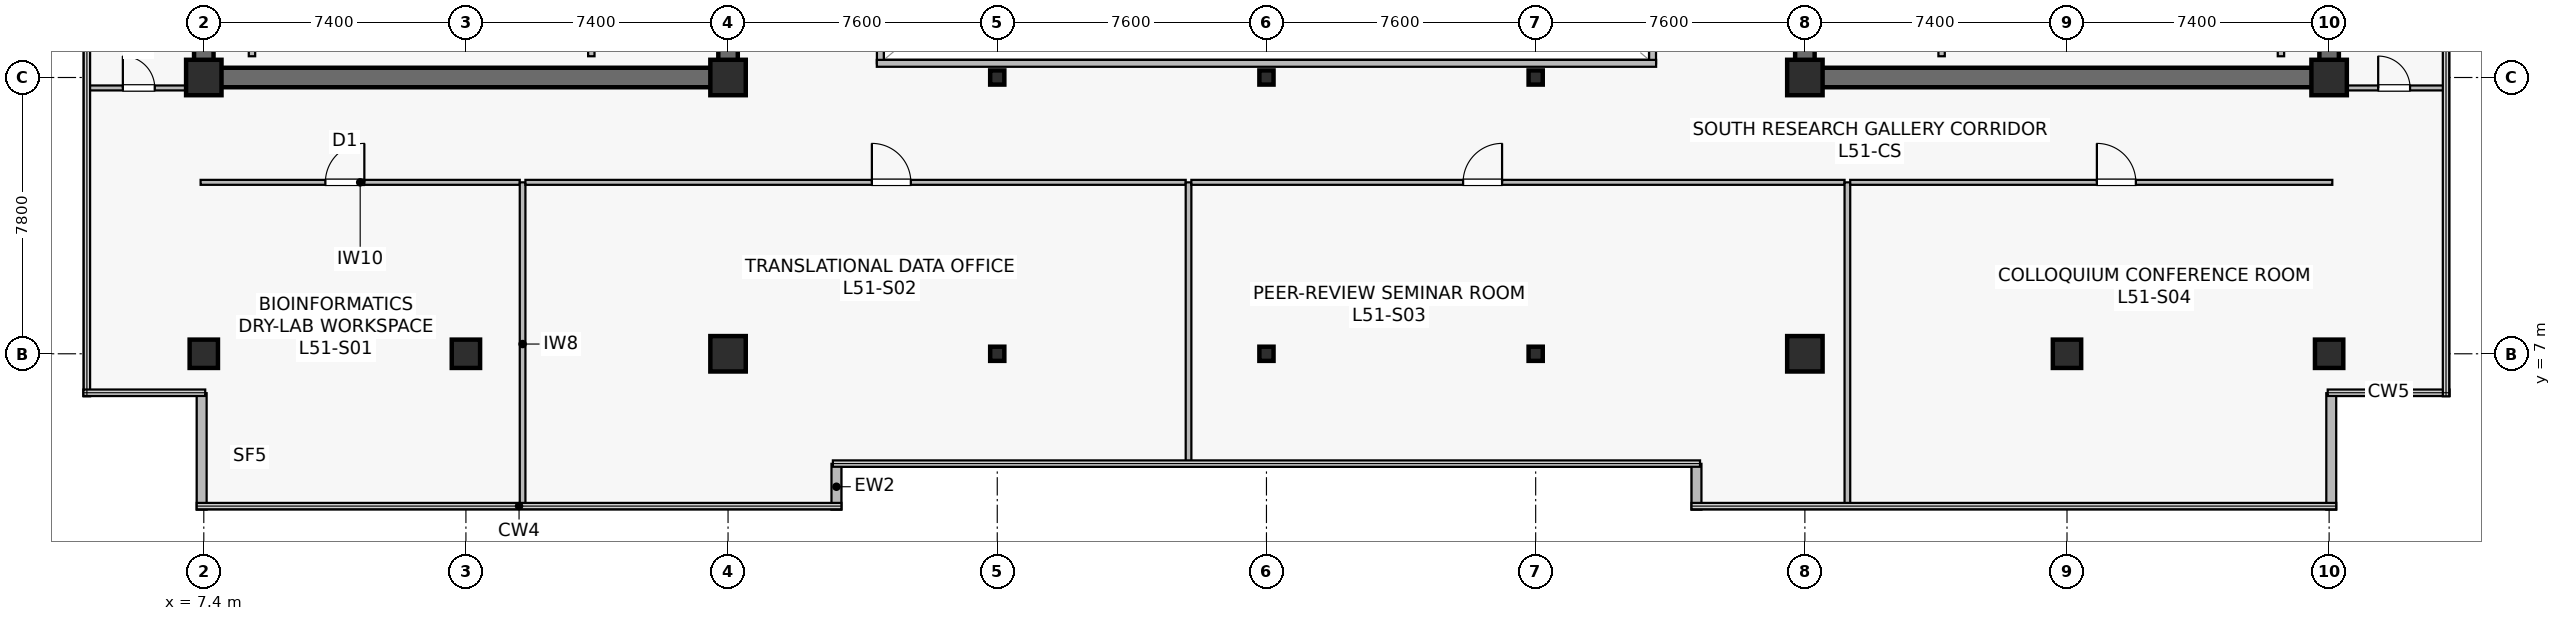
"""IFC4 building model, lengths in metres.
Left out: names, types, materials, properties, quantities, classifications, styles, units other than length and angle.
Written with IfcOpenShell. Run it as: python <this file> out.ifc"""

import sys

from ifc_helpers import new_model, si_unit, direction, frame, frame_2d, origin, origin_2d, place, context, subcontext, project, spatial, rectangle, hollow_rectangle, extrude, source, transform, mapped, element, fill, save


model = new_model("IFC4")
c1 = context("Model", 3, precision=1e-05, world=origin(), true_north=direction((0.0, 1.0)))
c2 = subcontext(c1, "Body", "Model", "MODEL_VIEW")
j1 = project(units=[si_unit("LENGTHUNIT", "METRE"), si_unit("PLANEANGLEUNIT", "RADIAN")], contexts=[c1])
p1 = place(None, origin())
s1 = spatial("IfcSite", under=j1, at=p1, CompositionType="ELEMENT")
p2 = place(p1, origin())
s2 = spatial("IfcBuilding", under=s1, at=p2, CompositionType="ELEMENT")
p3 = place(p2, frame((0.0, 0.0, 213.7)))
s3 = spatial("IfcBuildingStorey", under=s2, at=p3, CompositionType="ELEMENT", Elevation=213.7)
p4 = place(p3, frame((7.125, 14.8, 0.0), z_axis=(0.0, 0.0, 1.0), x_axis=(1.0, 0.0, 0.0)))
e1 = element("IfcWall", 1, at=p4, inside=s3, PredefinedType="SHEAR", context=c2, shape_type="SweptSolid", body=[
    extrude(rectangle(XDim=15.35, YDim=0.55, at=frame_2d((7.675, 0.0))), origin(), (0.0, 0.0, 1.0), 3.8),
])
p5 = place(p3, frame((7.4, 15.075, 0.0), z_axis=(0.0, 0.0, 1.0), x_axis=(0.0, 1.0, 0.0)))
e2 = element("IfcWall", 2, at=p5, inside=s3, PredefinedType="SHEAR", context=c2, shape_type="SweptSolid", body=[
    extrude(rectangle(XDim=18.45, YDim=0.55, at=frame_2d((9.225, 0.0))), origin(), (0.0, 0.0, 1.0), 3.8),
])
p6 = place(p3, frame((22.2, 15.075, 0.0), z_axis=(0.0, 0.0, 1.0), x_axis=(0.0, 1.0, 0.0)))
e3 = element("IfcWall", 3, at=p6, inside=s3, PredefinedType="SHEAR", context=c2, shape_type="SweptSolid", body=[
    extrude(rectangle(XDim=18.45, YDim=0.55, at=frame_2d((9.225, 0.0))), origin(), (0.0, 0.0, 1.0), 3.8),
])
p7 = place(p6, frame((3.475, 0.0, 0.0)))
e4 = element("IfcOpeningElement", 4, at=p7, cuts=e3, PredefinedType="OPENING", context=c2, shape_type="SweptSolid", body=[
    extrude(rectangle(XDim=1.42, YDim=2.2, at=frame_2d((0.71, 1.1))), frame((0.0, 0.285, 0.0), z_axis=(0.0, -1.0, 0.0), x_axis=(1.0, 0.0, 0.0)), (0.0, 0.0, 1.0), 0.57),
])
p8 = place(p3, frame((52.325, 14.8, 0.0), z_axis=(0.0, 0.0, 1.0), x_axis=(1.0, 0.0, 0.0)))
e5 = element("IfcWall", 5, at=p8, inside=s3, PredefinedType="SHEAR", context=c2, shape_type="SweptSolid", body=[
    extrude(rectangle(XDim=15.35, YDim=0.55, at=frame_2d((7.675, 0.0))), origin(), (0.0, 0.0, 1.0), 3.8),
])
p9 = place(p3, frame((52.6, 15.075, 0.0), z_axis=(0.0, 0.0, 1.0), x_axis=(0.0, 1.0, 0.0)))
e6 = element("IfcWall", 6, at=p9, inside=s3, PredefinedType="SHEAR", context=c2, shape_type="SweptSolid", body=[
    extrude(rectangle(XDim=18.45, YDim=0.55, at=frame_2d((9.225, 0.0))), origin(), (0.0, 0.0, 1.0), 3.8),
])
p10 = place(p9, frame((3.475, 0.0, 0.0)))
e7 = element("IfcOpeningElement", 7, at=p10, cuts=e6, PredefinedType="OPENING", context=c2, shape_type="SweptSolid", body=[
    extrude(rectangle(XDim=1.42, YDim=2.2, at=frame_2d((0.71, 1.1))), frame((0.0, 0.285, 0.0), z_axis=(0.0, -1.0, 0.0), x_axis=(1.0, 0.0, 0.0)), (0.0, 0.0, 1.0), 0.57),
])
p11 = place(p3, frame((67.4, 15.075, 0.0), z_axis=(0.0, 0.0, 1.0), x_axis=(0.0, 1.0, 0.0)))
e8 = element("IfcWall", 8, at=p11, inside=s3, PredefinedType="SHEAR", context=c2, shape_type="SweptSolid", body=[
    extrude(rectangle(XDim=18.45, YDim=0.55, at=frame_2d((9.225, 0.0))), origin(), (0.0, 0.0, 1.0), 3.8),
])
m1 = source(origin(), c2, "Body", "SweptSolid", [
    extrude(rectangle(XDim=0.8, YDim=0.8, at=origin_2d()), origin(), (0.0, 0.0, 1.0), 4.1),
])
p12 = place(p3, frame((14.8, 7.0, 0.0), z_axis=(0.0, 0.0, 1.0), x_axis=(1.0, 0.0, 0.0)))
e9 = element("IfcColumn", 9, at=p12, inside=s3, PredefinedType="COLUMN", context=c2, shape_type="MappedRepresentation", body=[
    mapped(m1, transform((0.0, 0.0, 0.0), scale=1.0)),
])
m2 = source(origin(), c2, "Body", "SweptSolid", [
    extrude(rectangle(XDim=1.0, YDim=1.0, at=origin_2d()), origin(), (0.0, 0.0, 1.0), 4.1),
])
for number, where, z_axis, x_axis in (
    (10, (22.2, 7.0, 0.0), (0.0, 0.0, 1.0), (1.0, 0.0, 0.0)),
    (11, (7.4, 14.8, 0.0), (0.0, 0.0, 1.0), (1.0, 0.0, 0.0)),
    (12, (22.2, 14.8, 0.0), (0.0, 0.0, 1.0), (1.0, 0.0, 0.0)),
    (13, (52.6, 7.0, 0.0), (0.0, 0.0, 1.0), (1.0, 0.0, 0.0)),
):
    element("IfcColumn", number, at=place(p3, frame(where, z_axis=z_axis, x_axis=x_axis)), inside=s3, PredefinedType="COLUMN", context=c2, shape_type="MappedRepresentation", body=[
        mapped(m2, transform((0.0, 0.0, 0.0), scale=1.0)),
    ])
p13 = place(p3, frame((60.0, 7.0, 0.0), z_axis=(0.0, 0.0, 1.0), x_axis=(1.0, 0.0, 0.0)))
e14 = element("IfcColumn", 14, at=p13, inside=s3, PredefinedType="COLUMN", context=c2, shape_type="MappedRepresentation", body=[
    mapped(m1, transform((0.0, 0.0, 0.0), scale=1.0)),
])
for number, where, z_axis, x_axis in (
    (15, (52.6, 14.8, 0.0), (0.0, 0.0, 1.0), (1.0, 0.0, 0.0)),
    (16, (67.4, 14.8, 0.0), (0.0, 0.0, 1.0), (1.0, 0.0, 0.0)),
):
    element("IfcColumn", number, at=place(p3, frame(where, z_axis=z_axis, x_axis=x_axis)), inside=s3, PredefinedType="COLUMN", context=c2, shape_type="MappedRepresentation", body=[
        mapped(m2, transform((0.0, 0.0, 0.0), scale=1.0)),
    ])
for number, where, z_axis, x_axis in (
    (17, (7.4, 7.0, 0.0), (0.0, 0.0, 1.0), (1.0, 0.0, 0.0)),
    (18, (67.4, 7.0, 0.0), (0.0, 0.0, 1.0), (1.0, 0.0, 0.0)),
):
    element("IfcColumn", number, at=place(p3, frame(where, z_axis=z_axis, x_axis=x_axis)), inside=s3, PredefinedType="COLUMN", context=c2, shape_type="MappedRepresentation", body=[
        mapped(m1, transform((0.0, 0.0, 0.0), scale=1.0)),
    ])
m3 = source(origin(), c2, "Body", "SweptSolid", [
    extrude(hollow_rectangle(XDim=0.4, YDim=0.4, WallThickness=0.019, at=origin_2d()), origin(), (0.0, 0.0, 1.0), 4.1),
])
for number, where, z_axis, x_axis in (
    (19, (29.8, 7.0, 0.0), (0.0, 0.0, 1.0), (1.0, 0.0, 0.0)),
    (20, (29.8, 14.8, 0.0), (0.0, 0.0, 1.0), (1.0, 0.0, 0.0)),
    (21, (37.4, 7.0, 0.0), (0.0, 0.0, 1.0), (1.0, 0.0, 0.0)),
    (22, (37.4, 14.8, 0.0), (0.0, 0.0, 1.0), (1.0, 0.0, 0.0)),
    (23, (45.0, 7.0, 0.0), (0.0, 0.0, 1.0), (1.0, 0.0, 0.0)),
    (24, (45.0, 14.8, 0.0), (0.0, 0.0, 1.0), (1.0, 0.0, 0.0)),
):
    element("IfcColumn", number, at=place(p3, frame(where, z_axis=z_axis, x_axis=x_axis)), inside=s3, PredefinedType="COLUMN", context=c2, shape_type="MappedRepresentation", body=[
        mapped(m3, transform((0.0, 0.0, 0.0), scale=1.0)),
    ])
for number, where, z_axis, x_axis in (
    (25, (25.26, 2.6, 0.0), (0.0, 0.0, 1.0), (0.0, 1.0, 0.0)),
    (26, (49.54, 3.893, 0.0), (0.0, 0.0, 1.0), (0.0, -1.0, 0.0)),
):
    element("IfcWall", number, at=place(p3, frame(where, z_axis=z_axis, x_axis=x_axis)), inside=s3, PredefinedType="STANDARD", context=c2, shape_type="SweptSolid", body=[
        extrude(rectangle(XDim=1.293, YDim=0.28, at=frame_2d((0.646, 0.0))), origin(), (0.0, 0.0, 1.0), 3.8),
    ])
for number, where, z_axis, x_axis in (
    (27, (67.46, 2.6, 0.0), (0.0, 0.0, 1.0), (0.0, 1.0, 0.0)),
    (28, (7.34, 5.888, 0.0), (0.0, 0.0, 1.0), (0.0, -1.0, 0.0)),
):
    element("IfcWall", number, at=place(p3, frame(where, z_axis=z_axis, x_axis=x_axis)), inside=s3, PredefinedType="STANDARD", context=c2, shape_type="SweptSolid", body=[
        extrude(rectangle(XDim=3.288, YDim=0.28, at=frame_2d((1.644, 0.0))), origin(), (0.0, 0.0, 1.0), 3.8),
    ])
for number, where, z_axis, x_axis in (
    (29, (18.34, 15.4, 0.0), (0.0, 0.0, 1.0), (0.0, 1.0, 0.0)),
    (30, (8.76, 15.4, 0.0), (0.0, 0.0, 1.0), (0.0, 1.0, 0.0)),
    (31, (56.46, 15.4, 0.0), (0.0, 0.0, 1.0), (0.0, 1.0, 0.0)),
    (32, (66.04, 15.4, 0.0), (0.0, 0.0, 1.0), (0.0, 1.0, 0.0)),
):
    element("IfcWall", number, at=place(p3, frame(where, z_axis=z_axis, x_axis=x_axis)), inside=s3, PredefinedType="SOLIDWALL", context=c2, shape_type="SweptSolid", body=[
        extrude(rectangle(XDim=2.4, YDim=0.18, at=frame_2d((1.2, 0.0))), origin(), (0.0, 0.0, 1.0), 3.8),
    ])
p14 = place(p3, frame((26.5, 15.2, 0.0), z_axis=(0.0, 0.0, 1.0), x_axis=(0.0, 1.0, 0.0)))
e33 = element("IfcWall", 33, at=p14, inside=s3, PredefinedType="SOLIDWALL", context=c2, shape_type="SweptSolid", body=[
    extrude(rectangle(XDim=18.2, YDim=0.195, at=frame_2d((9.1, 0.0))), origin(), (0.0, 0.0, 1.0), 3.8),
])
p15 = place(p14, frame((1.8, 0.0, 0.9)))
e34 = element("IfcOpeningElement", 34, at=p15, cuts=e33, PredefinedType="OPENING", context=c2, shape_type="SweptSolid", body=[
    extrude(rectangle(XDim=1.2, YDim=1.35, at=frame_2d((0.6, 0.675))), frame((0.0, 0.107, 0.0), z_axis=(0.0, -1.0, 0.0), x_axis=(1.0, 0.0, 0.0)), (0.0, 0.0, 1.0), 0.215),
])
p16 = place(p14, frame((13.2, 0.0, 0.9)))
e35 = element("IfcOpeningElement", 35, at=p16, cuts=e33, PredefinedType="OPENING", context=c2, shape_type="SweptSolid", body=[
    extrude(rectangle(XDim=1.2, YDim=1.35, at=frame_2d((0.6, 0.675))), frame((0.0, 0.107, 0.0), z_axis=(0.0, -1.0, 0.0), x_axis=(1.0, 0.0, 0.0)), (0.0, 0.0, 1.0), 0.215),
])
p17 = place(p3, frame((48.3, 15.2, 0.0), z_axis=(0.0, 0.0, 1.0), x_axis=(0.0, 1.0, 0.0)))
e36 = element("IfcWall", 36, at=p17, inside=s3, PredefinedType="SOLIDWALL", context=c2, shape_type="SweptSolid", body=[
    extrude(rectangle(XDim=18.2, YDim=0.195, at=frame_2d((9.1, 0.0))), origin(), (0.0, 0.0, 1.0), 3.8),
])
p18 = place(p17, frame((1.8, 0.0, 0.9)))
e37 = element("IfcOpeningElement", 37, at=p18, cuts=e36, PredefinedType="OPENING", context=c2, shape_type="SweptSolid", body=[
    extrude(rectangle(XDim=1.2, YDim=1.35, at=frame_2d((0.6, 0.675))), frame((0.0, 0.107, 0.0), z_axis=(0.0, -1.0, 0.0), x_axis=(1.0, 0.0, 0.0)), (0.0, 0.0, 1.0), 0.215),
])
p19 = place(p17, frame((13.2, 0.0, 0.9)))
e38 = element("IfcOpeningElement", 38, at=p19, cuts=e36, PredefinedType="OPENING", context=c2, shape_type="SweptSolid", body=[
    extrude(rectangle(XDim=1.2, YDim=1.35, at=frame_2d((0.6, 0.675))), frame((0.0, 0.107, 0.0), z_axis=(0.0, -1.0, 0.0), x_axis=(1.0, 0.0, 0.0)), (0.0, 0.0, 1.0), 0.215),
])
p20 = place(p3, frame((26.4, 15.2, 0.0), z_axis=(0.0, 0.0, 1.0), x_axis=(1.0, 0.0, 0.0)))
e39 = element("IfcWall", 39, at=p20, inside=s3, PredefinedType="SOLIDWALL", context=c2, shape_type="SweptSolid", body=[
    extrude(rectangle(XDim=22.0, YDim=0.195, at=frame_2d((11.0, 0.0))), origin(), (0.0, 0.0, 1.0), 3.8),
])
p21 = place(p3, frame((7.31, 11.84, 0.0), z_axis=(0.0, 0.0, 1.0), x_axis=(1.0, 0.0, 0.0)))
e40 = element("IfcWall", 40, at=p21, inside=s3, PredefinedType="PARTITIONING", context=c2, shape_type="SweptSolid", body=[
    extrude(rectangle(XDim=9.01, YDim=0.14, at=frame_2d((4.505, 0.0))), origin(), (0.0, 0.0, 1.0), 3.197),
])
p22 = place(p21, frame((3.522, 0.0, 0.0)))
e41 = element("IfcOpeningElement", 41, at=p22, cuts=e40, PredefinedType="OPENING", context=c2, shape_type="SweptSolid", body=[
    extrude(rectangle(XDim=1.1, YDim=2.18, at=frame_2d((0.55, 1.09))), frame((0.0, 0.08, 0.0), z_axis=(0.0, -1.0, 0.0), x_axis=(1.0, 0.0, 0.0)), (0.0, 0.0, 1.0), 0.16),
])
p23 = place(p3, frame((16.4, 2.71, 0.0), z_axis=(0.0, 0.0, 1.0), x_axis=(0.0, 1.0, 0.0)))
e42 = element("IfcWall", 42, at=p23, inside=s3, PredefinedType="PARTITIONING", context=c2, shape_type="SweptSolid", body=[
    extrude(rectangle(XDim=9.13, YDim=0.16, at=frame_2d((4.565, 0.0))), origin(), (0.0, 0.0, 1.0), 3.135),
])
p24 = place(p3, frame((16.48, 11.84, 0.0), z_axis=(0.0, 0.0, 1.0), x_axis=(1.0, 0.0, 0.0)))
e43 = element("IfcWall", 43, at=p24, inside=s3, PredefinedType="PARTITIONING", context=c2, shape_type="SweptSolid", body=[
    extrude(rectangle(XDim=18.64, YDim=0.14, at=frame_2d((9.32, 0.0))), origin(), (0.0, 0.0, 1.0), 3.197),
])
p25 = place(p24, frame((9.781, 0.0, 0.0)))
e44 = element("IfcOpeningElement", 44, at=p25, cuts=e43, PredefinedType="OPENING", context=c2, shape_type="SweptSolid", body=[
    extrude(rectangle(XDim=1.1, YDim=2.18, at=frame_2d((0.55, 1.09))), frame((0.0, 0.08, 0.0), z_axis=(0.0, -1.0, 0.0), x_axis=(1.0, 0.0, 0.0)), (0.0, 0.0, 1.0), 0.16),
])
p26 = place(p3, frame((35.2, 3.91, 0.0), z_axis=(0.0, 0.0, 1.0), x_axis=(0.0, 1.0, 0.0)))
e45 = element("IfcWall", 45, at=p26, inside=s3, PredefinedType="PARTITIONING", context=c2, shape_type="SweptSolid", body=[
    extrude(rectangle(XDim=7.93, YDim=0.16, at=frame_2d((3.965, 0.0))), origin(), (0.0, 0.0, 1.0), 3.135),
])
p27 = place(p3, frame((35.28, 11.84, 0.0), z_axis=(0.0, 0.0, 1.0), x_axis=(1.0, 0.0, 0.0)))
e46 = element("IfcWall", 46, at=p27, inside=s3, PredefinedType="PARTITIONING", context=c2, shape_type="SweptSolid", body=[
    extrude(rectangle(XDim=18.44, YDim=0.14, at=frame_2d((9.22, 0.0))), origin(), (0.0, 0.0, 1.0), 3.197),
])
p28 = place(p27, frame((7.672, 0.0, 0.0)))
e47 = element("IfcOpeningElement", 47, at=p28, cuts=e46, PredefinedType="OPENING", context=c2, shape_type="SweptSolid", body=[
    extrude(rectangle(XDim=1.1, YDim=2.18, at=frame_2d((0.55, 1.09))), frame((0.0, 0.08, 0.0), z_axis=(0.0, -1.0, 0.0), x_axis=(1.0, 0.0, 0.0)), (0.0, 0.0, 1.0), 0.16),
])
p29 = place(p3, frame((53.8, 2.71, 0.0), z_axis=(0.0, 0.0, 1.0), x_axis=(0.0, 1.0, 0.0)))
e48 = element("IfcWall", 48, at=p29, inside=s3, PredefinedType="PARTITIONING", context=c2, shape_type="SweptSolid", body=[
    extrude(rectangle(XDim=9.13, YDim=0.16, at=frame_2d((4.565, 0.0))), origin(), (0.0, 0.0, 1.0), 3.135),
])
p30 = place(p3, frame((53.88, 11.84, 0.0), z_axis=(0.0, 0.0, 1.0), x_axis=(1.0, 0.0, 0.0)))
e49 = element("IfcWall", 49, at=p30, inside=s3, PredefinedType="PARTITIONING", context=c2, shape_type="SweptSolid", body=[
    extrude(rectangle(XDim=13.61, YDim=0.14, at=frame_2d((6.805, 0.0))), origin(), (0.0, 0.0, 1.0), 3.197),
])
p31 = place(p30, frame((6.964, 0.0, 0.0)))
e50 = element("IfcOpeningElement", 50, at=p31, cuts=e49, PredefinedType="OPENING", context=c2, shape_type="SweptSolid", body=[
    extrude(rectangle(XDim=1.1, YDim=2.18, at=frame_2d((0.55, 1.09))), frame((0.0, 0.08, 0.0), z_axis=(0.0, -1.0, 0.0), x_axis=(1.0, 0.0, 0.0)), (0.0, 0.0, 1.0), 0.16),
])
p32 = place(p3, frame((4.11, 14.505, 0.0), z_axis=(0.0, 0.0, 1.0), x_axis=(1.0, 0.0, 0.0)))
e51 = element("IfcWall", 51, at=p32, inside=s3, PredefinedType="PARTITIONING", context=c2, shape_type="SweptSolid", body=[
    extrude(rectangle(XDim=2.91, YDim=0.14, at=frame_2d((1.455, 0.0))), origin(), (0.0, 0.0, 1.0), 3.8),
])
p33 = place(p32, frame((1.005, 0.0, 0.0)))
e52 = element("IfcOpeningElement", 52, at=p33, cuts=e51, PredefinedType="OPENING", context=c2, shape_type="SweptSolid", body=[
    extrude(rectangle(XDim=0.9, YDim=2.1, at=frame_2d((0.45, 1.05))), frame((0.0, 0.08, 0.0), z_axis=(0.0, -1.0, 0.0), x_axis=(1.0, 0.0, 0.0)), (0.0, 0.0, 1.0), 0.16),
])
p34 = place(p3, frame((67.78, 14.505, 0.0), z_axis=(0.0, 0.0, 1.0), x_axis=(1.0, 0.0, 0.0)))
e53 = element("IfcWall", 53, at=p34, inside=s3, PredefinedType="PARTITIONING", context=c2, shape_type="SweptSolid", body=[
    extrude(rectangle(XDim=2.91, YDim=0.14, at=frame_2d((1.455, 0.0))), origin(), (0.0, 0.0, 1.0), 3.8),
])
p35 = place(p34, frame((1.005, 0.0, 0.0)))
e54 = element("IfcOpeningElement", 54, at=p35, cuts=e53, PredefinedType="OPENING", context=c2, shape_type="SweptSolid", body=[
    extrude(rectangle(XDim=0.9, YDim=2.1, at=frame_2d((0.45, 1.05))), frame((0.0, 0.08, 0.0), z_axis=(0.0, -1.0, 0.0), x_axis=(1.0, 0.0, 0.0)), (0.0, 0.0, 1.0), 0.16),
])
m4 = source(origin(), c2, "Body", "SweptSolid", [
    extrude(rectangle(XDim=1.1, YDim=2.18, at=frame_2d((0.55, 1.09))), frame((0.0, 0.025, 0.0), z_axis=(0.0, -1.0, 0.0), x_axis=(1.0, 0.0, 0.0)), (0.0, 0.0, 1.0), 0.05),
])
p36 = place(p22, origin())
e55 = element("IfcDoor", 55, at=p36, inside=s3, OperationType="SINGLE_SWING_RIGHT", PredefinedType="DOOR", context=c2, shape_type="MappedRepresentation", body=[
    mapped(m4, transform((0.0, 0.0, 0.0), scale=1.0)),
])
fill(e41, e55)
p37 = place(p25, origin())
e56 = element("IfcDoor", 56, at=p37, inside=s3, OperationType="SINGLE_SWING_LEFT", PredefinedType="DOOR", context=c2, shape_type="MappedRepresentation", body=[
    mapped(m4, transform((0.0, 0.0, 0.0), scale=1.0)),
])
fill(e44, e56)
p38 = place(p28, origin())
e57 = element("IfcDoor", 57, at=p38, inside=s3, OperationType="SINGLE_SWING_RIGHT", PredefinedType="DOOR", context=c2, shape_type="MappedRepresentation", body=[
    mapped(m4, transform((0.0, 0.0, 0.0), scale=1.0)),
])
fill(e47, e57)
p39 = place(p31, origin())
e58 = element("IfcDoor", 58, at=p39, inside=s3, OperationType="SINGLE_SWING_LEFT", PredefinedType="DOOR", context=c2, shape_type="MappedRepresentation", body=[
    mapped(m4, transform((0.0, 0.0, 0.0), scale=1.0)),
])
fill(e50, e58)
m5 = source(origin(), c2, "Body", "SweptSolid", [
    extrude(rectangle(XDim=0.9, YDim=2.1, at=frame_2d((0.45, 1.05))), frame((0.0, 0.025, 0.0), z_axis=(0.0, -1.0, 0.0), x_axis=(1.0, 0.0, 0.0)), (0.0, 0.0, 1.0), 0.05),
])
p40 = place(p33, origin())
e59 = element("IfcDoor", 59, at=p40, inside=s3, OperationType="SINGLE_SWING_LEFT", PredefinedType="DOOR", context=c2, shape_type="MappedRepresentation", body=[
    mapped(m5, transform((0.0, 0.0, 0.0), scale=1.0)),
])
fill(e52, e59)
p41 = place(p35, origin())
e60 = element("IfcDoor", 60, at=p41, inside=s3, OperationType="SINGLE_SWING_LEFT", PredefinedType="DOOR", context=c2, shape_type="MappedRepresentation", body=[
    mapped(m5, transform((0.0, 0.0, 0.0), scale=1.0)),
])
fill(e54, e60)
save(model, sys.argv[1])
